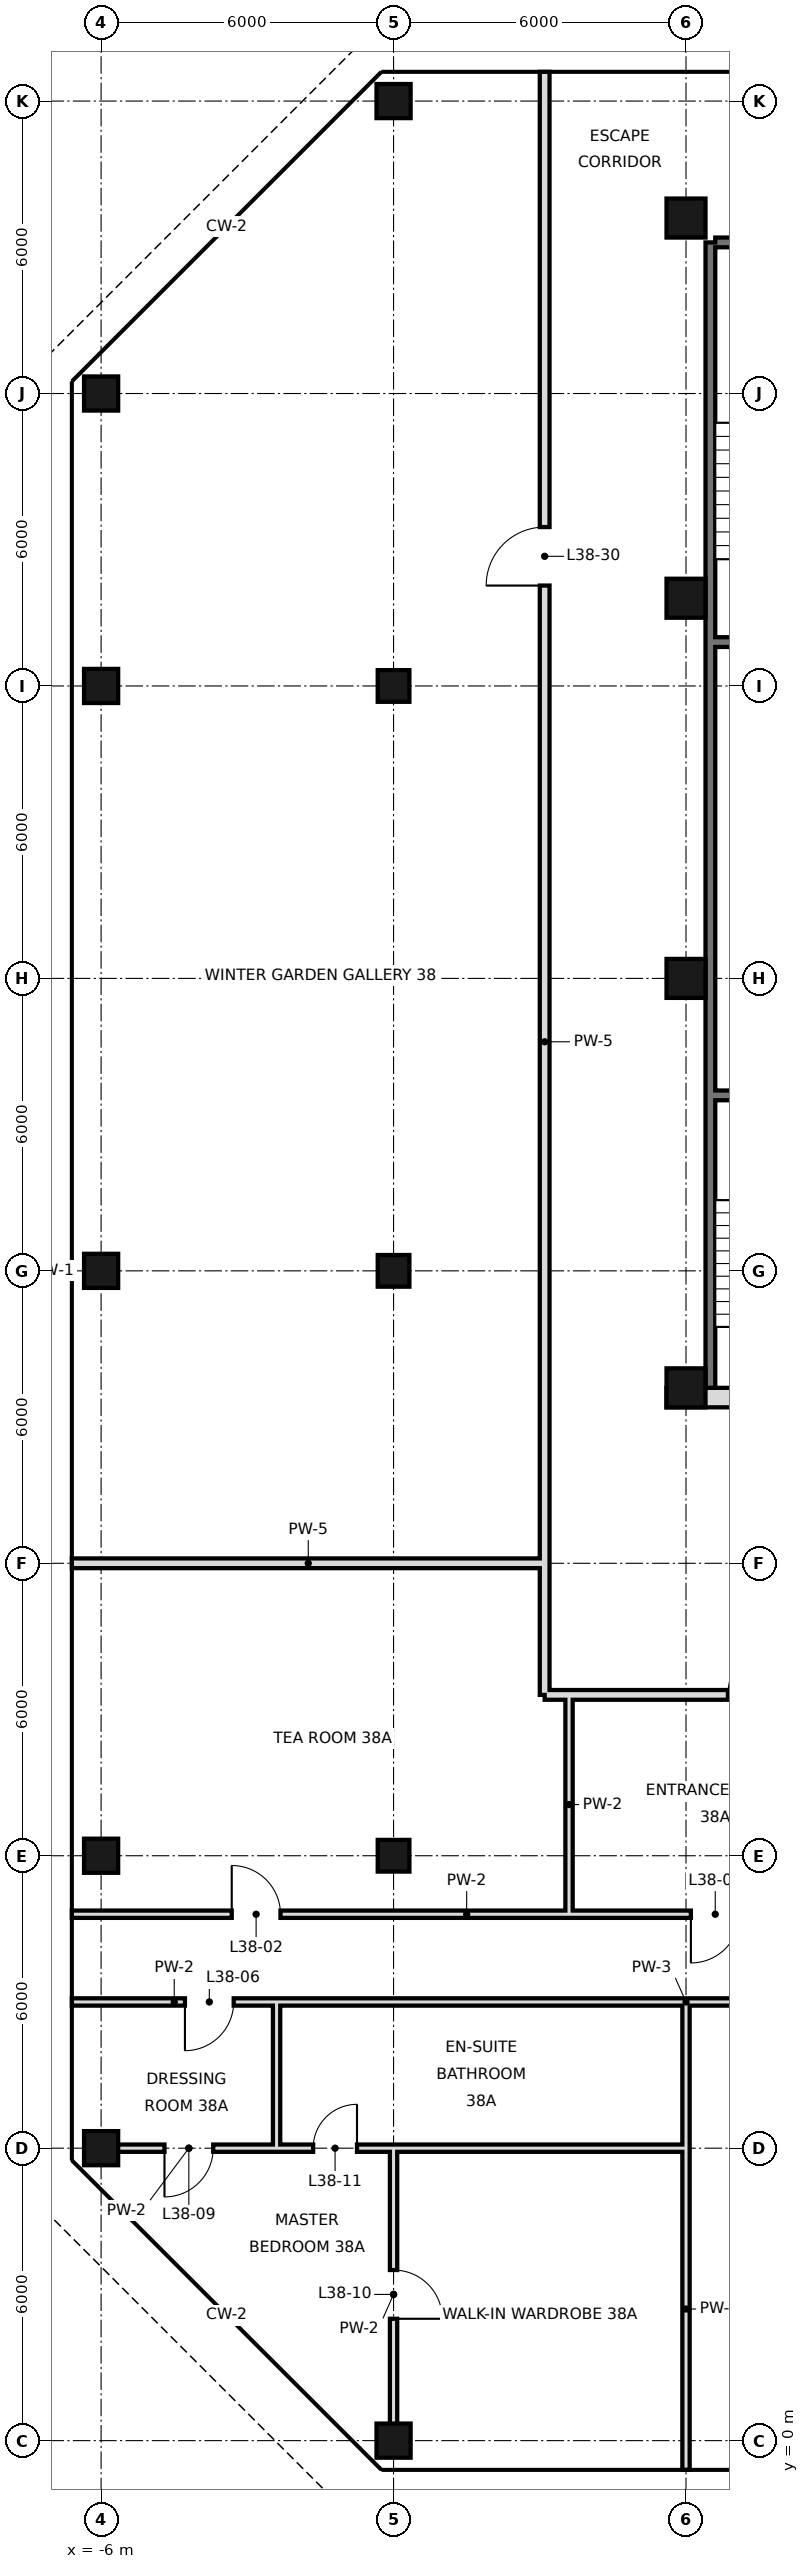
"""IFC4 building model, lengths in metres.
Left out: names, types, materials, properties, quantities, classifications, styles, units other than length and angle.
Written with IfcOpenShell. Run it as: python <this file> out.ifc"""

import sys

from ifc_helpers import new_model, si_unit, direction, frame, frame_2d, origin, origin_2d, place, context, subcontext, project, spatial, rectangle, hollow_rectangle, extrude, element, fill, save


model = new_model("IFC4")
c1 = context("Model", 3, precision=1e-05, world=origin(), true_north=direction((0.0, 1.0)))
c2 = subcontext(c1, "Body", "Model", "MODEL_VIEW")
j1 = project(units=[si_unit("LENGTHUNIT", "METRE"), si_unit("PLANEANGLEUNIT", "RADIAN")], contexts=[c1])
p1 = place(None, origin())
s1 = spatial("IfcSite", under=j1, at=p1, CompositionType="ELEMENT")
p2 = place(p1, origin())
s2 = spatial("IfcBuilding", under=s1, at=p2, CompositionType="ELEMENT")
p3 = place(p2, frame((0.0, 0.0, 167.2)))
s3 = spatial("IfcBuildingStorey", under=s2, at=p3, CompositionType="ELEMENT", Elevation=167.2)
for number, where, z_axis, x_axis in (
    (1, (-6.0, 6.0, 0.0), (0.0, 0.0, 1.0), (1.0, 0.0, 0.0)),
    (2, (-6.0, 12.0, 0.0), (0.0, 0.0, 1.0), (1.0, 0.0, 0.0)),
    (3, (-6.0, 24.0, 0.0), (0.0, 0.0, 1.0), (1.0, 0.0, 0.0)),
    (4, (-6.0, 36.0, 0.0), (0.0, 0.0, 1.0), (1.0, 0.0, 0.0)),
    (5, (-6.0, 42.0, 0.0), (0.0, 0.0, 1.0), (1.0, 0.0, 0.0)),
    (6, (0.0, 0.0, 0.0), (0.0, 0.0, 1.0), (1.0, 0.0, 0.0)),
):
    element("IfcColumn", number, at=place(p3, frame(where, z_axis=z_axis, x_axis=x_axis)), inside=s3, PredefinedType="COLUMN", context=c2, shape_type="SweptSolid", body=[
        extrude(hollow_rectangle(XDim=0.7, YDim=0.7, WallThickness=0.036, at=origin_2d()), origin(), (0.0, 0.0, 1.0), 3.6),
    ])
for number, where, z_axis, x_axis in (
    (7, (0.0, 12.0, 0.0), (0.0, 0.0, 1.0), (1.0, 0.0, 0.0)),
    (8, (0.0, 24.0, 0.0), (0.0, 0.0, 1.0), (1.0, 0.0, 0.0)),
    (9, (0.0, 36.0, 0.0), (0.0, 0.0, 1.0), (1.0, 0.0, 0.0)),
):
    element("IfcColumn", number, at=place(p3, frame(where, z_axis=z_axis, x_axis=x_axis)), inside=s3, PredefinedType="COLUMN", context=c2, shape_type="SweptSolid", body=[
        extrude(hollow_rectangle(XDim=0.65, YDim=0.65, WallThickness=0.032, at=origin_2d()), origin(), (0.0, 0.0, 1.0), 3.6),
    ])
p4 = place(p3, frame((0.0, 48.0, 0.0), z_axis=(0.0, 0.0, 1.0), x_axis=(1.0, 0.0, 0.0)))
e10 = element("IfcColumn", 10, at=p4, inside=s3, PredefinedType="COLUMN", context=c2, shape_type="SweptSolid", body=[
    extrude(hollow_rectangle(XDim=0.7, YDim=0.7, WallThickness=0.036, at=origin_2d()), origin(), (0.0, 0.0, 1.0), 3.6),
])
for number, where, z_axis, x_axis in (
    (11, (6.0, 21.6, 0.0), (0.0, 0.0, 1.0), (1.0, 0.0, 0.0)),
    (12, (6.0, 30.0, 0.0), (0.0, 0.0, 1.0), (1.0, 0.0, 0.0)),
    (13, (6.0, 37.8, 0.0), (0.0, 0.0, 1.0), (1.0, 0.0, 0.0)),
    (14, (6.0, 45.6, 0.0), (0.0, 0.0, 1.0), (1.0, 0.0, 0.0)),
):
    element("IfcColumn", number, at=place(p3, frame(where, z_axis=z_axis, x_axis=x_axis)), inside=s3, PredefinedType="COLUMN", context=c2, shape_type="SweptSolid", body=[
        extrude(hollow_rectangle(XDim=0.8, YDim=0.8, WallThickness=0.045, at=origin_2d()), origin(), (0.0, 0.0, 1.0), 3.6),
    ])
p5 = place(p3, frame((-2.4, 6.0, 0.0), z_axis=(0.0, 0.0, 1.0), x_axis=(0.0, 1.0, 0.0)))
e15 = element("IfcWall", 15, at=p5, inside=s3, PredefinedType="PARTITIONING", context=c2, shape_type="SweptSolid", body=[
    extrude(rectangle(XDim=3.0, YDim=0.15, at=frame_2d((1.5, 0.0))), origin(), (0.0, 0.0, 1.0), 3.42),
])
p6 = place(p3, frame((0.0, 0.0, 0.0), z_axis=(0.0, 0.0, 1.0), x_axis=(0.0, 1.0, 0.0)))
e16 = element("IfcWall", 16, at=p6, inside=s3, PredefinedType="PARTITIONING", context=c2, shape_type="SweptSolid", body=[
    extrude(rectangle(XDim=6.0, YDim=0.15, at=frame_2d((3.0, 0.0))), origin(), (0.0, 0.0, 1.0), 2.72),
])
p7 = place(p6, frame((2.5, 0.0, 0.0)))
e17 = element("IfcOpeningElement", 17, at=p7, cuts=e16, PredefinedType="OPENING", context=c2, shape_type="SweptSolid", body=[
    extrude(rectangle(XDim=1.0, YDim=2.4, at=frame_2d((0.5, 1.2))), frame((0.0, 0.085, 0.0), z_axis=(0.0, -1.0, 0.0), x_axis=(1.0, 0.0, 0.0)), (0.0, 0.0, 1.0), 0.17),
])
p8 = place(p3, frame((3.1, 15.3, 0.0), z_axis=(0.0, 0.0, 1.0), x_axis=(0.0, 1.0, 0.0)))
e18 = element("IfcWall", 18, at=p8, inside=s3, PredefinedType="SOLIDWALL", context=c2, shape_type="SweptSolid", body=[
    extrude(rectangle(XDim=33.3, YDim=0.2, at=frame_2d((16.65, 0.0))), origin(), (0.0, 0.0, 1.0), 2.72),
])
p9 = place(p8, frame((22.76, 0.0, 0.0)))
e19 = element("IfcOpeningElement", 19, at=p9, cuts=e18, PredefinedType="OPENING", context=c2, shape_type="SweptSolid", body=[
    extrude(rectangle(XDim=1.2, YDim=2.4, at=frame_2d((0.6, 1.2))), frame((0.0, 0.11, 0.0), z_axis=(0.0, -1.0, 0.0), x_axis=(1.0, 0.0, 0.0)), (0.0, 0.0, 1.0), 0.22),
])
p10 = place(p3, frame((3.6, 10.8, 0.0), z_axis=(0.0, 0.0, 1.0), x_axis=(0.0, 1.0, 0.0)))
e20 = element("IfcWall", 20, at=p10, inside=s3, PredefinedType="PARTITIONING", context=c2, shape_type="SweptSolid", body=[
    extrude(rectangle(XDim=4.5, YDim=0.15, at=frame_2d((2.25, 0.0))), origin(), (0.0, 0.0, 1.0), 3.42),
])
p11 = place(p3, frame((6.0, -0.6, 0.0), z_axis=(0.0, 0.0, 1.0), x_axis=(0.0, 1.0, 0.0)))
e21 = element("IfcWall", 21, at=p11, inside=s3, PredefinedType="PARTITIONING", context=c2, shape_type="SweptSolid", body=[
    extrude(rectangle(XDim=6.6, YDim=0.15, at=frame_2d((3.3, 0.0))), origin(), (0.0, 0.0, 1.0), 2.72),
])
p12 = place(p3, frame((6.0, 6.0, 0.0), z_axis=(0.0, 0.0, 1.0), x_axis=(0.0, 1.0, 0.0)))
e22 = element("IfcWall", 22, at=p12, inside=s3, PredefinedType="PARTITIONING", context=c2, shape_type="SweptSolid", body=[
    extrude(rectangle(XDim=3.0, YDim=0.15, at=frame_2d((1.5, 0.0))), origin(), (0.0, 0.0, 1.0), 2.72),
])
p13 = place(p3, frame((-6.6, 10.8, 0.0), z_axis=(0.0, 0.0, 1.0), x_axis=(1.0, 0.0, 0.0)))
e23 = element("IfcWall", 23, at=p13, inside=s3, PredefinedType="PARTITIONING", context=c2, shape_type="SweptSolid", body=[
    extrude(rectangle(XDim=16.2, YDim=0.15, at=frame_2d((8.1, 0.0))), origin(), (0.0, 0.0, 1.0), 3.42),
])
p14 = place(p13, frame((12.7, 0.0, 0.0)))
e24 = element("IfcOpeningElement", 24, at=p14, cuts=e23, PredefinedType="OPENING", context=c2, shape_type="SweptSolid", body=[
    extrude(rectangle(XDim=1.0, YDim=2.4, at=frame_2d((0.5, 1.2))), frame((0.0, 0.085, 0.0), z_axis=(0.0, -1.0, 0.0), x_axis=(1.0, 0.0, 0.0)), (0.0, 0.0, 1.0), 0.17),
])
p15 = place(p13, frame((3.28, 0.0, 0.0)))
e25 = element("IfcOpeningElement", 25, at=p15, cuts=e23, PredefinedType="OPENING", context=c2, shape_type="SweptSolid", body=[
    extrude(rectangle(XDim=1.0, YDim=2.4, at=frame_2d((0.5, 1.2))), frame((0.0, 0.085, 0.0), z_axis=(0.0, -1.0, 0.0), x_axis=(1.0, 0.0, 0.0)), (0.0, 0.0, 1.0), 0.17),
])
p16 = place(p3, frame((3.1, 15.3, 0.0), z_axis=(0.0, 0.0, 1.0), x_axis=(1.0, 0.0, 0.0)))
e26 = element("IfcWall", 26, at=p16, inside=s3, PredefinedType="SOLIDWALL", context=c2, shape_type="SweptSolid", body=[
    extrude(rectangle(XDim=6.5, YDim=0.2, at=frame_2d((3.25, 0.0))), origin(), (0.0, 0.0, 1.0), 2.72),
])
p17 = place(p16, frame((3.76, 0.0, 0.0)))
e27 = element("IfcOpeningElement", 27, at=p17, cuts=e26, PredefinedType="OPENING", context=c2, shape_type="SweptSolid", body=[
    extrude(rectangle(XDim=1.2, YDim=2.4, at=frame_2d((0.6, 1.2))), frame((0.0, 0.11, 0.0), z_axis=(0.0, -1.0, 0.0), x_axis=(1.0, 0.0, 0.0)), (0.0, 0.0, 1.0), 0.22),
])
p18 = place(p3, frame((-6.6, 18.0, 0.0), z_axis=(0.0, 0.0, 1.0), x_axis=(1.0, 0.0, 0.0)))
e28 = element("IfcWall", 28, at=p18, inside=s3, PredefinedType="SOLIDWALL", context=c2, shape_type="SweptSolid", body=[
    extrude(rectangle(XDim=9.7, YDim=0.2, at=frame_2d((4.85, 0.0))), origin(), (0.0, 0.0, 1.0), 2.72),
])
p19 = place(p3, frame((-6.0, 6.0, 0.0), z_axis=(0.0, 0.0, 1.0), x_axis=(1.0, 0.0, 0.0)))
e29 = element("IfcWall", 29, at=p19, inside=s3, PredefinedType="PARTITIONING", context=c2, shape_type="SweptSolid", body=[
    extrude(rectangle(XDim=3.6, YDim=0.15, at=frame_2d((1.8, 0.0))), origin(), (0.0, 0.0, 1.0), 2.97),
])
p20 = place(p19, frame((1.3, 0.0, 0.0)))
e30 = element("IfcOpeningElement", 30, at=p20, cuts=e29, PredefinedType="OPENING", context=c2, shape_type="SweptSolid", body=[
    extrude(rectangle(XDim=1.0, YDim=2.4, at=frame_2d((0.5, 1.2))), frame((0.0, 0.085, 0.0), z_axis=(0.0, -1.0, 0.0), x_axis=(1.0, 0.0, 0.0)), (0.0, 0.0, 1.0), 0.17),
])
p21 = place(p3, frame((-2.4, 6.0, 0.0), z_axis=(0.0, 0.0, 1.0), x_axis=(1.0, 0.0, 0.0)))
e31 = element("IfcWall", 31, at=p21, inside=s3, PredefinedType="PARTITIONING", context=c2, shape_type="SweptSolid", body=[
    extrude(rectangle(XDim=8.4, YDim=0.15, at=frame_2d((4.2, 0.0))), origin(), (0.0, 0.0, 1.0), 2.97),
])
p22 = place(p21, frame((0.75, 0.0, 0.0)))
e32 = element("IfcOpeningElement", 32, at=p22, cuts=e31, PredefinedType="OPENING", context=c2, shape_type="SweptSolid", body=[
    extrude(rectangle(XDim=0.9, YDim=2.4, at=frame_2d((0.45, 1.2))), frame((0.0, 0.085, 0.0), z_axis=(0.0, -1.0, 0.0), x_axis=(1.0, 0.0, 0.0)), (0.0, 0.0, 1.0), 0.17),
])
p23 = place(p3, frame((-6.6, 9.0, 0.0), z_axis=(0.0, 0.0, 1.0), x_axis=(1.0, 0.0, 0.0)))
e33 = element("IfcWall", 33, at=p23, inside=s3, PredefinedType="PARTITIONING", context=c2, shape_type="SweptSolid", body=[
    extrude(rectangle(XDim=4.2, YDim=0.15, at=frame_2d((2.1, 0.0))), origin(), (0.0, 0.0, 1.0), 3.42),
])
p24 = place(p23, frame((2.32, 0.0, 0.0)))
e34 = element("IfcOpeningElement", 34, at=p24, cuts=e33, PredefinedType="OPENING", context=c2, shape_type="SweptSolid", body=[
    extrude(rectangle(XDim=1.0, YDim=2.4, at=frame_2d((0.5, 1.2))), frame((0.0, 0.085, 0.0), z_axis=(0.0, -1.0, 0.0), x_axis=(1.0, 0.0, 0.0)), (0.0, 0.0, 1.0), 0.17),
])
p25 = place(p3, frame((6.0, 9.0, 0.0), z_axis=(0.0, 0.0, 1.0), x_axis=(1.0, 0.0, 0.0)))
e35 = element("IfcWall", 35, at=p25, inside=s3, PredefinedType="PARTITIONING", context=c2, shape_type="SweptSolid", body=[
    extrude(rectangle(XDim=18.0, YDim=0.15, at=frame_2d((9.0, 0.0))), origin(), (0.0, 0.0, 1.0), 3.42),
])
p26 = place(p25, frame((3.4, 0.0, 0.0)))
e36 = element("IfcOpeningElement", 36, at=p26, cuts=e35, PredefinedType="OPENING", context=c2, shape_type="SweptSolid", body=[
    extrude(rectangle(XDim=1.0, YDim=2.4, at=frame_2d((0.5, 1.2))), frame((0.0, 0.085, 0.0), z_axis=(0.0, -1.0, 0.0), x_axis=(1.0, 0.0, 0.0)), (0.0, 0.0, 1.0), 0.17),
])
p27 = place(p25, frame((9.16, 0.0, 0.0)))
e37 = element("IfcOpeningElement", 37, at=p27, cuts=e35, PredefinedType="OPENING", context=c2, shape_type="SweptSolid", body=[
    extrude(rectangle(XDim=1.8, YDim=2.4, at=frame_2d((0.9, 1.2))), frame((0.0, 0.085, 0.0), z_axis=(0.0, -1.0, 0.0), x_axis=(1.0, 0.0, 0.0)), (0.0, 0.0, 1.0), 0.17),
])
p28 = place(p3, frame((-2.4, 9.0, 0.0), z_axis=(0.0, 0.0, 1.0), x_axis=(1.0, 0.0, 0.0)))
e38 = element("IfcWall", 38, at=p28, inside=s3, PredefinedType="PARTITIONING", context=c2, shape_type="SweptSolid", body=[
    extrude(rectangle(XDim=8.4, YDim=0.15, at=frame_2d((4.2, 0.0))), origin(), (0.0, 0.0, 1.0), 3.42),
])
p29 = place(p3, frame((6.5, 21.6, 0.0), z_axis=(0.0, 0.0, 1.0), x_axis=(0.0, 1.0, 0.0)))
e39 = element("IfcWall", 39, at=p29, inside=s3, PredefinedType="SOLIDWALL", context=c2, shape_type="SweptSolid", body=[
    extrude(rectangle(XDim=23.5, YDim=0.2, at=frame_2d((11.75, 0.0))), origin(), (0.0, 0.0, 1.0), 3.42),
])
p30 = place(p3, frame((6.6, 45.1, 0.0), z_axis=(0.0, 0.0, 1.0), x_axis=(1.0, 0.0, 0.0)))
e40 = element("IfcWall", 40, at=p30, inside=s3, PredefinedType="SOLIDWALL", context=c2, shape_type="SweptSolid", body=[
    extrude(rectangle(XDim=34.8, YDim=0.2, at=frame_2d((17.4, 0.0))), origin(), (0.0, 0.0, 1.0), 3.42),
])
p31 = place(p3, frame((5.6, 21.4, 0.0), z_axis=(0.0, 0.0, 1.0), x_axis=(1.0, 0.0, 0.0)))
e41 = element("IfcWall", 41, at=p31, inside=s3, PredefinedType="SOLIDWALL", context=c2, shape_type="SweptSolid", body=[
    extrude(rectangle(XDim=36.8, YDim=0.4, at=frame_2d((18.4, 0.0))), origin(), (0.0, 0.0, 1.0), 3.42),
])
p32 = place(p31, frame((8.5, 0.0, 0.0)))
e42 = element("IfcOpeningElement", 42, at=p32, cuts=e41, PredefinedType="OPENING", context=c2, shape_type="SweptSolid", body=[
    extrude(rectangle(XDim=1.8, YDim=2.1, at=frame_2d((0.9, 1.05))), frame((0.0, 0.21, 0.0), z_axis=(0.0, -1.0, 0.0), x_axis=(1.0, 0.0, 0.0)), (0.0, 0.0, 1.0), 0.42),
])
p33 = place(p31, frame((17.5, 0.0, 0.0)))
e43 = element("IfcOpeningElement", 43, at=p33, cuts=e41, PredefinedType="OPENING", context=c2, shape_type="SweptSolid", body=[
    extrude(rectangle(XDim=1.8, YDim=2.1, at=frame_2d((0.9, 1.05))), frame((0.0, 0.21, 0.0), z_axis=(0.0, -1.0, 0.0), x_axis=(1.0, 0.0, 0.0)), (0.0, 0.0, 1.0), 0.42),
])
p34 = place(p31, frame((26.5, 0.0, 0.0)))
e44 = element("IfcOpeningElement", 44, at=p34, cuts=e41, PredefinedType="OPENING", context=c2, shape_type="SweptSolid", body=[
    extrude(rectangle(XDim=1.8, YDim=2.1, at=frame_2d((0.9, 1.05))), frame((0.0, 0.21, 0.0), z_axis=(0.0, -1.0, 0.0), x_axis=(1.0, 0.0, 0.0)), (0.0, 0.0, 1.0), 0.42),
])
p35 = place(p31, frame((4.5, 0.0, 0.0)))
e45 = element("IfcOpeningElement", 45, at=p35, cuts=e41, PredefinedType="OPENING", context=c2, shape_type="SweptSolid", body=[
    extrude(rectangle(XDim=1.2, YDim=2.1, at=frame_2d((0.6, 1.05))), frame((0.0, 0.21, 0.0), z_axis=(0.0, -1.0, 0.0), x_axis=(1.0, 0.0, 0.0)), (0.0, 0.0, 1.0), 0.42),
])
p36 = place(p31, frame((31.1, 0.0, 0.0)))
e46 = element("IfcOpeningElement", 46, at=p36, cuts=e41, PredefinedType="OPENING", context=c2, shape_type="SweptSolid", body=[
    extrude(rectangle(XDim=1.2, YDim=2.1, at=frame_2d((0.6, 1.05))), frame((0.0, 0.21, 0.0), z_axis=(0.0, -1.0, 0.0), x_axis=(1.0, 0.0, 0.0)), (0.0, 0.0, 1.0), 0.42),
])
p37 = place(p3, frame((6.6, 27.6, 0.0), z_axis=(0.0, 0.0, 1.0), x_axis=(1.0, 0.0, 0.0)))
e47 = element("IfcWall", 47, at=p37, inside=s3, PredefinedType="SOLIDWALL", context=c2, shape_type="SweptSolid", body=[
    extrude(rectangle(XDim=5.3, YDim=0.2, at=frame_2d((2.65, 0.0))), origin(), (0.0, 0.0, 1.0), 3.42),
])
p38 = place(p3, frame((6.6, 36.9, 0.0), z_axis=(0.0, 0.0, 1.0), x_axis=(1.0, 0.0, 0.0)))
e48 = element("IfcWall", 48, at=p38, inside=s3, PredefinedType="SOLIDWALL", context=c2, shape_type="SweptSolid", body=[
    extrude(rectangle(XDim=2.7, YDim=0.2, at=frame_2d((1.35, 0.0))), origin(), (0.0, 0.0, 1.0), 3.42),
])
p39 = place(p14, frame((1.0, 0.0, 0.0), z_axis=(0.0, 0.0, 1.0), x_axis=(-1.0, 0.0, 0.0)))
e49 = element("IfcDoor", 49, at=p39, inside=s3, OperationType="SINGLE_SWING_RIGHT", PredefinedType="DOOR", context=c2, shape_type="SweptSolid", body=[
    extrude(rectangle(XDim=1.0, YDim=2.4, at=frame_2d((0.5, 1.2))), frame((0.0, 0.025, 0.0), z_axis=(0.0, -1.0, 0.0), x_axis=(1.0, 0.0, 0.0)), (0.0, 0.0, 1.0), 0.05),
])
fill(e24, e49)
p40 = place(p15, origin())
e50 = element("IfcDoor", 50, at=p40, inside=s3, OperationType="SINGLE_SWING_LEFT", PredefinedType="DOOR", context=c2, shape_type="SweptSolid", body=[
    extrude(rectangle(XDim=1.0, YDim=2.4, at=frame_2d((0.5, 1.2))), frame((0.0, 0.025, 0.0), z_axis=(0.0, -1.0, 0.0), x_axis=(1.0, 0.0, 0.0)), (0.0, 0.0, 1.0), 0.05),
])
fill(e25, e50)
p41 = place(p24, frame((1.0, 0.0, 0.0), z_axis=(0.0, 0.0, 1.0), x_axis=(-1.0, 0.0, 0.0)))
e51 = element("IfcDoor", 51, at=p41, inside=s3, OperationType="SINGLE_SWING_RIGHT", PredefinedType="DOOR", context=c2, shape_type="SweptSolid", body=[
    extrude(rectangle(XDim=1.0, YDim=2.4, at=frame_2d((0.5, 1.2))), frame((0.0, 0.025, 0.0), z_axis=(0.0, -1.0, 0.0), x_axis=(1.0, 0.0, 0.0)), (0.0, 0.0, 1.0), 0.05),
])
fill(e34, e51)
p42 = place(p20, frame((1.0, 0.0, 0.0), z_axis=(0.0, 0.0, 1.0), x_axis=(-1.0, 0.0, 0.0)))
e52 = element("IfcDoor", 52, at=p42, inside=s3, OperationType="SINGLE_SWING_RIGHT", PredefinedType="DOOR", context=c2, shape_type="SweptSolid", body=[
    extrude(rectangle(XDim=1.0, YDim=2.4, at=frame_2d((0.5, 1.2))), frame((0.0, 0.025, 0.0), z_axis=(0.0, -1.0, 0.0), x_axis=(1.0, 0.0, 0.0)), (0.0, 0.0, 1.0), 0.05),
])
fill(e30, e52)
p43 = place(p7, frame((1.0, 0.0, 0.0), z_axis=(0.0, 0.0, 1.0), x_axis=(-1.0, 0.0, 0.0)))
e53 = element("IfcDoor", 53, at=p43, inside=s3, OperationType="SINGLE_SWING_RIGHT", PredefinedType="DOOR", context=c2, shape_type="SweptSolid", body=[
    extrude(rectangle(XDim=1.0, YDim=2.4, at=frame_2d((0.5, 1.2))), frame((0.0, 0.025, 0.0), z_axis=(0.0, -1.0, 0.0), x_axis=(1.0, 0.0, 0.0)), (0.0, 0.0, 1.0), 0.05),
])
fill(e17, e53)
p44 = place(p22, frame((0.9, 0.0, 0.0), z_axis=(0.0, 0.0, 1.0), x_axis=(-1.0, 0.0, 0.0)))
e54 = element("IfcDoor", 54, at=p44, inside=s3, OperationType="SINGLE_SWING_LEFT", PredefinedType="DOOR", context=c2, shape_type="SweptSolid", body=[
    extrude(rectangle(XDim=0.9, YDim=2.4, at=frame_2d((0.45, 1.2))), frame((0.0, 0.025, 0.0), z_axis=(0.0, -1.0, 0.0), x_axis=(1.0, 0.0, 0.0)), (0.0, 0.0, 1.0), 0.05),
])
fill(e32, e54)
p45 = place(p17, frame((1.2, 0.0, 0.0), z_axis=(0.0, 0.0, 1.0), x_axis=(-1.0, 0.0, 0.0)))
e55 = element("IfcDoor", 55, at=p45, inside=s3, OperationType="SINGLE_SWING_LEFT", PredefinedType="DOOR", context=c2, shape_type="SweptSolid", body=[
    extrude(rectangle(XDim=1.2, YDim=2.4, at=frame_2d((0.6, 1.2))), frame((0.0, 0.025, 0.0), z_axis=(0.0, -1.0, 0.0), x_axis=(1.0, 0.0, 0.0)), (0.0, 0.0, 1.0), 0.05),
])
fill(e27, e55)
p46 = place(p9, origin())
e56 = element("IfcDoor", 56, at=p46, inside=s3, OperationType="SINGLE_SWING_LEFT", PredefinedType="DOOR", context=c2, shape_type="SweptSolid", body=[
    extrude(rectangle(XDim=1.2, YDim=2.4, at=frame_2d((0.6, 1.2))), frame((0.0, 0.025, 0.0), z_axis=(0.0, -1.0, 0.0), x_axis=(1.0, 0.0, 0.0)), (0.0, 0.0, 1.0), 0.05),
])
fill(e19, e56)
save(model, sys.argv[1])
